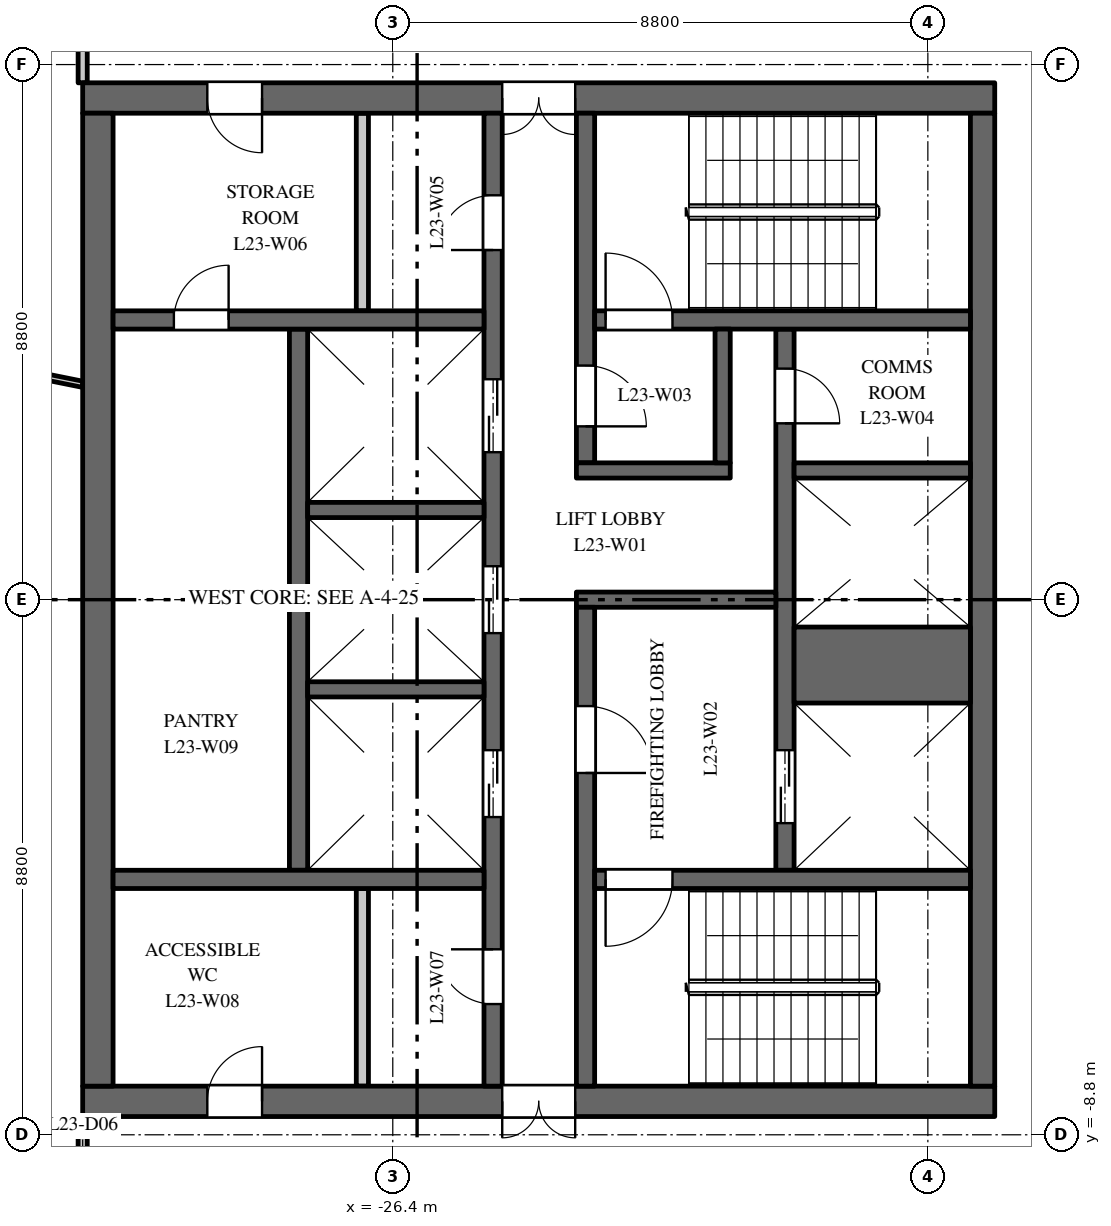
"""IFC4 building model, lengths in metres.
Left out: names, types, materials, properties, quantities, classifications, styles, units other than length and angle.
Written with IfcOpenShell. Run it as: python <this file> out.ifc"""

import sys

from ifc_helpers import new_model, si_unit, direction, frame, frame_2d, origin, place, context, subcontext, project, spatial, rectangle, extrude, element, fill, save


model = new_model("IFC4")
c1 = context("Model", 3, precision=1e-05, world=origin(), true_north=direction((0.0, 1.0)))
c2 = subcontext(c1, "Body", "Model", "MODEL_VIEW")
j1 = project(units=[si_unit("LENGTHUNIT", "METRE"), si_unit("PLANEANGLEUNIT", "RADIAN")], contexts=[c1])
p1 = place(None, origin())
s1 = spatial("IfcSite", under=j1, at=p1, CompositionType="ELEMENT")
p2 = place(p1, origin())
s2 = spatial("IfcBuilding", under=s1, at=p2, CompositionType="ELEMENT")
p3 = place(p2, frame((0.0, 0.0, 104.0)))
s3 = spatial("IfcBuildingStorey", under=s2, at=p3, CompositionType="ELEMENT", Elevation=104.0)
p4 = place(p3, frame((-16.5, 8.25, 0.0), z_axis=(0.0, 0.0, 1.0), x_axis=(-1.0, 0.0, 0.0)))
e1 = element("IfcWall", 1, at=p4, inside=s3, PredefinedType="SHEAR", context=c2, shape_type="SweptSolid", body=[
    extrude(rectangle(XDim=15.0, YDim=0.5, at=frame_2d((7.5, 0.0))), origin(), (0.0, 0.0, 1.0), 3.7),
])
p5 = place(p4, frame((6.9, 0.0, 0.0)))
e2 = element("IfcOpeningElement", 2, at=p5, cuts=e1, PredefinedType="OPENING", context=c2, shape_type="SweptSolid", body=[
    extrude(rectangle(XDim=1.2, YDim=2.1, at=frame_2d((0.6, 1.05))), frame((0.0, 0.26, 0.0), z_axis=(0.0, -1.0, 0.0), x_axis=(1.0, 0.0, 0.0)), (0.0, 0.0, 1.0), 0.52),
])
p6 = place(p4, frame((12.05, 0.0, 0.0)))
e3 = element("IfcOpeningElement", 3, at=p6, cuts=e1, PredefinedType="OPENING", context=c2, shape_type="SweptSolid", body=[
    extrude(rectangle(XDim=0.9, YDim=2.1, at=frame_2d((0.45, 1.05))), frame((0.0, 0.26, 0.0), z_axis=(0.0, -1.0, 0.0), x_axis=(1.0, 0.0, 0.0)), (0.0, 0.0, 1.0), 0.52),
])
p7 = place(p3, frame((-16.5, -8.25, 0.0), z_axis=(0.0, 0.0, 1.0), x_axis=(-1.0, 0.0, 0.0)))
e4 = element("IfcWall", 4, at=p7, inside=s3, PredefinedType="SHEAR", context=c2, shape_type="SweptSolid", body=[
    extrude(rectangle(XDim=15.0, YDim=0.5, at=frame_2d((7.5, 0.0))), origin(), (0.0, 0.0, 1.0), 3.7),
])
p8 = place(p7, frame((6.9, 0.0, 0.0)))
e5 = element("IfcOpeningElement", 5, at=p8, cuts=e4, PredefinedType="OPENING", context=c2, shape_type="SweptSolid", body=[
    extrude(rectangle(XDim=1.2, YDim=2.1, at=frame_2d((0.6, 1.05))), frame((0.0, 0.26, 0.0), z_axis=(0.0, -1.0, 0.0), x_axis=(1.0, 0.0, 0.0)), (0.0, 0.0, 1.0), 0.52),
])
p9 = place(p7, frame((12.05, 0.0, 0.0)))
e6 = element("IfcOpeningElement", 6, at=p9, cuts=e4, PredefinedType="OPENING", context=c2, shape_type="SweptSolid", body=[
    extrude(rectangle(XDim=0.9, YDim=2.1, at=frame_2d((0.45, 1.05))), frame((0.0, 0.26, 0.0), z_axis=(0.0, -1.0, 0.0), x_axis=(1.0, 0.0, 0.0)), (0.0, 0.0, 1.0), 0.52),
])
p10 = place(p3, frame((-27.95, -4.45, 0.0), z_axis=(0.0, 0.0, 1.0), x_axis=(0.0, 1.0, 0.0)))
e7 = element("IfcWall", 7, at=p10, inside=s3, PredefinedType="SHEAR", context=c2, shape_type="SweptSolid", body=[
    extrude(rectangle(XDim=8.9, YDim=0.3, at=frame_2d((4.45, 0.0))), origin(), (0.0, 0.0, 1.0), 3.7),
])
p11 = place(p3, frame((-19.95, -4.45, 0.0), z_axis=(0.0, 0.0, 1.0), x_axis=(0.0, 1.0, 0.0)))
e8 = element("IfcWall", 8, at=p11, inside=s3, PredefinedType="SHEAR", context=c2, shape_type="SweptSolid", body=[
    extrude(rectangle(XDim=8.9, YDim=0.3, at=frame_2d((4.45, 0.0))), origin(), (0.0, 0.0, 1.0), 3.7),
])
p12 = place(p11, frame((0.775, 0.0, 0.0)))
e9 = element("IfcOpeningElement", 9, at=p12, cuts=e8, PredefinedType="OPENING", context=c2, shape_type="SweptSolid", body=[
    extrude(rectangle(XDim=1.2, YDim=2.1, at=frame_2d((0.6, 1.05))), frame((0.0, 0.16, 0.0), z_axis=(0.0, -1.0, 0.0), x_axis=(1.0, 0.0, 0.0)), (0.0, 0.0, 1.0), 0.32),
])
p13 = place(p11, frame((7.35, 0.0, 0.0)))
e10 = element("IfcOpeningElement", 10, at=p13, cuts=e8, PredefinedType="OPENING", context=c2, shape_type="SweptSolid", body=[
    extrude(rectangle(XDim=0.9, YDim=2.1, at=frame_2d((0.45, 1.05))), frame((0.0, 0.16, 0.0), z_axis=(0.0, -1.0, 0.0), x_axis=(1.0, 0.0, 0.0)), (0.0, 0.0, 1.0), 0.32),
])
p14 = place(p3, frame((-24.75, -8.0, 0.0), z_axis=(0.0, 0.0, 1.0), x_axis=(0.0, 1.0, 0.0)))
e11 = element("IfcWall", 11, at=p14, inside=s3, PredefinedType="SHEAR", context=c2, shape_type="SweptSolid", body=[
    extrude(rectangle(XDim=16.0, YDim=0.3, at=frame_2d((8.0, 0.0))), origin(), (0.0, 0.0, 1.0), 3.7),
])
p15 = place(p14, frame((4.425, 0.0, 0.0)))
e12 = element("IfcOpeningElement", 12, at=p15, cuts=e11, PredefinedType="OPENING", context=c2, shape_type="SweptSolid", body=[
    extrude(rectangle(XDim=1.1, YDim=2.1, at=frame_2d((0.55, 1.05))), frame((0.0, 0.16, 0.0), z_axis=(0.0, -1.0, 0.0), x_axis=(1.0, 0.0, 0.0)), (0.0, 0.0, 1.0), 0.32),
])
p16 = place(p14, frame((7.45, 0.0, 0.0)))
e13 = element("IfcOpeningElement", 13, at=p16, cuts=e11, PredefinedType="OPENING", context=c2, shape_type="SweptSolid", body=[
    extrude(rectangle(XDim=1.1, YDim=2.1, at=frame_2d((0.55, 1.05))), frame((0.0, 0.16, 0.0), z_axis=(0.0, -1.0, 0.0), x_axis=(1.0, 0.0, 0.0)), (0.0, 0.0, 1.0), 0.32),
])
p17 = place(p14, frame((10.425, 0.0, 0.0)))
e14 = element("IfcOpeningElement", 14, at=p17, cuts=e11, PredefinedType="OPENING", context=c2, shape_type="SweptSolid", body=[
    extrude(rectangle(XDim=1.2, YDim=2.1, at=frame_2d((0.6, 1.05))), frame((0.0, 0.16, 0.0), z_axis=(0.0, -1.0, 0.0), x_axis=(1.0, 0.0, 0.0)), (0.0, 0.0, 1.0), 0.32),
])
p18 = place(p14, frame((13.75, 0.0, 0.0)))
e15 = element("IfcOpeningElement", 15, at=p18, cuts=e11, PredefinedType="OPENING", context=c2, shape_type="SweptSolid", body=[
    extrude(rectangle(XDim=0.9, YDim=2.1, at=frame_2d((0.45, 1.05))), frame((0.0, 0.16, 0.0), z_axis=(0.0, -1.0, 0.0), x_axis=(1.0, 0.0, 0.0)), (0.0, 0.0, 1.0), 0.32),
])
p19 = place(p14, frame((1.35, 0.0, 0.0)))
e16 = element("IfcOpeningElement", 16, at=p19, cuts=e11, PredefinedType="OPENING", context=c2, shape_type="SweptSolid", body=[
    extrude(rectangle(XDim=0.9, YDim=2.1, at=frame_2d((0.45, 1.05))), frame((0.0, 0.16, 0.0), z_axis=(0.0, -1.0, 0.0), x_axis=(1.0, 0.0, 0.0)), (0.0, 0.0, 1.0), 0.32),
])
p20 = place(p3, frame((-20.1, 0.0, 0.0), z_axis=(0.0, 0.0, 1.0), x_axis=(-1.0, 0.0, 0.0)))
e17 = element("IfcWall", 17, at=p20, inside=s3, PredefinedType="SHEAR", context=c2, shape_type="SweptSolid", body=[
    extrude(rectangle(XDim=3.28, YDim=0.25, at=frame_2d((1.64, 0.0))), origin(), (0.0, 0.0, 1.0), 3.7),
])
p21 = place(p3, frame((-16.7, -8.0, 0.0), z_axis=(0.0, 0.0, 1.0), x_axis=(0.0, 1.0, 0.0)))
e18 = element("IfcWall", 18, at=p21, inside=s3, PredefinedType="SHEAR", context=c2, shape_type="SweptSolid", body=[
    extrude(rectangle(XDim=16.0, YDim=0.4, at=frame_2d((8.0, 0.0))), origin(), (0.0, 0.0, 1.0), 3.7),
])
p22 = place(p3, frame((-31.25, -8.0, 0.0), z_axis=(0.0, 0.0, 1.0), x_axis=(0.0, 1.0, 0.0)))
e19 = element("IfcWall", 19, at=p22, inside=s3, PredefinedType="SHEAR", context=c2, shape_type="SweptSolid", body=[
    extrude(rectangle(XDim=16.0, YDim=0.5, at=frame_2d((8.0, 0.0))), origin(), (0.0, 0.0, 1.0), 3.7),
])
p23 = place(p3, frame((-24.9, 4.6, 0.0), z_axis=(0.0, 0.0, 1.0), x_axis=(-1.0, 0.0, 0.0)))
e20 = element("IfcWall", 20, at=p23, inside=s3, PredefinedType="SHEAR", context=c2, shape_type="SweptSolid", body=[
    extrude(rectangle(XDim=6.1, YDim=0.3, at=frame_2d((3.05, 0.0))), origin(), (0.0, 0.0, 1.0), 3.7),
])
p24 = place(p23, frame((4.2, 0.0, 0.0)))
e21 = element("IfcOpeningElement", 21, at=p24, cuts=e20, PredefinedType="OPENING", context=c2, shape_type="SweptSolid", body=[
    extrude(rectangle(XDim=0.9, YDim=2.1, at=frame_2d((0.45, 1.05))), frame((0.0, 0.16, 0.0), z_axis=(0.0, -1.0, 0.0), x_axis=(1.0, 0.0, 0.0)), (0.0, 0.0, 1.0), 0.32),
])
for number, where, z_axis, x_axis in (
    (22, (-26.9, 4.75, 0.0), (0.0, 0.0, 1.0), (0.0, 1.0, 0.0)),
    (23, (-26.9, -8.0, 0.0), (0.0, 0.0, 1.0), (0.0, 1.0, 0.0)),
):
    element("IfcWall", number, at=place(p3, frame(where, z_axis=z_axis, x_axis=x_axis)), inside=s3, PredefinedType="PARTITIONING", context=c2, shape_type="SweptSolid", body=[
        extrude(rectangle(XDim=3.25, YDim=0.2, at=frame_2d((1.625, 0.0))), origin(), (0.0, 0.0, 1.0), 3.7),
    ])
p25 = place(p3, frame((-24.9, -4.6, 0.0), z_axis=(0.0, 0.0, 1.0), x_axis=(-1.0, 0.0, 0.0)))
e24 = element("IfcWall", 24, at=p25, inside=s3, PredefinedType="SHEAR", context=c2, shape_type="SweptSolid", body=[
    extrude(rectangle(XDim=6.1, YDim=0.3, at=frame_2d((3.05, 0.0))), origin(), (0.0, 0.0, 1.0), 3.7),
])
p26 = place(p3, frame((-16.9, -1.075, 0.0), z_axis=(0.0, 0.0, 1.0), x_axis=(-1.0, 0.0, 0.0)))
e25 = element("IfcWall", 25, at=p26, inside=s3, PredefinedType="SHEAR", context=c2, shape_type="SweptSolid", body=[
    extrude(rectangle(XDim=2.9, YDim=1.25, at=frame_2d((1.45, 0.0))), origin(), (0.0, 0.0, 1.0), 3.7),
])
for number, where, z_axis, x_axis in (
    (26, (-16.9, 2.125, 0.0), (0.0, 0.0, 1.0), (-1.0, 0.0, 0.0)),
    (27, (-24.9, -1.475, 0.0), (0.0, 0.0, 1.0), (-1.0, 0.0, 0.0)),
    (28, (-24.9, 1.475, 0.0), (0.0, 0.0, 1.0), (-1.0, 0.0, 0.0)),
):
    element("IfcWall", number, at=place(p3, frame(where, z_axis=z_axis, x_axis=x_axis)), inside=s3, PredefinedType="SHEAR", context=c2, shape_type="SweptSolid", body=[
        extrude(rectangle(XDim=2.9, YDim=0.25, at=frame_2d((1.45, 0.0))), origin(), (0.0, 0.0, 1.0), 3.7),
    ])
p27 = place(p3, frame((-23.23, 2.25, 0.0), z_axis=(0.0, 0.0, 1.0), x_axis=(0.0, 1.0, 0.0)))
e29 = element("IfcWall", 29, at=p27, inside=s3, PredefinedType="SHEAR", context=c2, shape_type="SweptSolid", body=[
    extrude(rectangle(XDim=5.75, YDim=0.3, at=frame_2d((2.875, 0.0))), origin(), (0.0, 0.0, 1.0), 3.7),
])
p28 = place(p27, frame((0.6, 0.0, 0.0)))
e30 = element("IfcOpeningElement", 30, at=p28, cuts=e29, PredefinedType="OPENING", context=c2, shape_type="SweptSolid", body=[
    extrude(rectangle(XDim=1.0, YDim=2.1, at=frame_2d((0.5, 1.05))), frame((0.0, 0.16, 0.0), z_axis=(0.0, -1.0, 0.0), x_axis=(1.0, 0.0, 0.0)), (0.0, 0.0, 1.0), 0.32),
])
p29 = place(p3, frame((-23.23, -8.0, 0.0), z_axis=(0.0, 0.0, 1.0), x_axis=(0.0, 1.0, 0.0)))
e31 = element("IfcWall", 31, at=p29, inside=s3, PredefinedType="SHEAR", context=c2, shape_type="SweptSolid", body=[
    extrude(rectangle(XDim=7.875, YDim=0.3, at=frame_2d((3.938, 0.0))), origin(), (0.0, 0.0, 1.0), 3.7),
])
p30 = place(p29, frame((5.15, 0.0, 0.0)))
e32 = element("IfcOpeningElement", 32, at=p30, cuts=e31, PredefinedType="OPENING", context=c2, shape_type="SweptSolid", body=[
    extrude(rectangle(XDim=1.1, YDim=2.1, at=frame_2d((0.55, 1.05))), frame((0.0, 0.16, 0.0), z_axis=(0.0, -1.0, 0.0), x_axis=(1.0, 0.0, 0.0)), (0.0, 0.0, 1.0), 0.32),
])
p31 = place(p3, frame((-16.9, 4.6, 0.0), z_axis=(0.0, 0.0, 1.0), x_axis=(-1.0, 0.0, 0.0)))
e33 = element("IfcWall", 33, at=p31, inside=s3, PredefinedType="SHEAR", context=c2, shape_type="SweptSolid", body=[
    extrude(rectangle(XDim=6.18, YDim=0.3, at=frame_2d((3.09, 0.0))), origin(), (0.0, 0.0, 1.0), 3.7),
])
p32 = place(p31, frame((4.9, 0.0, 0.0)))
e34 = element("IfcOpeningElement", 34, at=p32, cuts=e33, PredefinedType="OPENING", context=c2, shape_type="SweptSolid", body=[
    extrude(rectangle(XDim=1.1, YDim=2.1, at=frame_2d((0.55, 1.05))), frame((0.0, 0.16, 0.0), z_axis=(0.0, -1.0, 0.0), x_axis=(1.0, 0.0, 0.0)), (0.0, 0.0, 1.0), 0.32),
])
p33 = place(p3, frame((-16.9, -4.6, 0.0), z_axis=(0.0, 0.0, 1.0), x_axis=(-1.0, 0.0, 0.0)))
e35 = element("IfcWall", 35, at=p33, inside=s3, PredefinedType="SHEAR", context=c2, shape_type="SweptSolid", body=[
    extrude(rectangle(XDim=6.18, YDim=0.3, at=frame_2d((3.09, 0.0))), origin(), (0.0, 0.0, 1.0), 3.7),
])
p34 = place(p33, frame((4.9, 0.0, 0.0)))
e36 = element("IfcOpeningElement", 36, at=p34, cuts=e35, PredefinedType="OPENING", context=c2, shape_type="SweptSolid", body=[
    extrude(rectangle(XDim=1.1, YDim=2.1, at=frame_2d((0.55, 1.05))), frame((0.0, 0.16, 0.0), z_axis=(0.0, -1.0, 0.0), x_axis=(1.0, 0.0, 0.0)), (0.0, 0.0, 1.0), 0.32),
])
p35 = place(p3, frame((-20.85, 2.125, 0.0), z_axis=(0.0, 0.0, 1.0), x_axis=(-1.0, 0.0, 0.0)))
e37 = element("IfcWall", 37, at=p35, inside=s3, PredefinedType="SHEAR", context=c2, shape_type="SweptSolid", body=[
    extrude(rectangle(XDim=2.53, YDim=0.25, at=frame_2d((1.265, 0.0))), origin(), (0.0, 0.0, 1.0), 3.7),
])
p36 = place(p3, frame((-20.975, 2.25, 0.0), z_axis=(0.0, 0.0, 1.0), x_axis=(0.0, 1.0, 0.0)))
e38 = element("IfcWall", 38, at=p36, inside=s3, PredefinedType="SHEAR", context=c2, shape_type="SweptSolid", body=[
    extrude(rectangle(XDim=2.2, YDim=0.25, at=frame_2d((1.1, 0.0))), origin(), (0.0, 0.0, 1.0), 3.7),
])
p37 = place(p3, frame((-35.512, 4.349, 0.0), z_axis=(0.0, 0.0, 1.0), x_axis=(0.980357474535, -0.197228857227, 0.0)))
e39 = element("IfcWall", 39, at=p37, inside=s3, PredefinedType="PARTITIONING", context=c2, shape_type="SweptSolid", body=[
    extrude(rectangle(XDim=4.092, YDim=0.1, at=frame_2d((2.046, 0.0))), origin(), (0.0, 0.0, 1.0), 3.2),
])
p38 = place(p3, frame((-31.5, -10.7, 0.0), z_axis=(0.0, 0.0, 1.0), x_axis=(0.0, 1.0, 0.0)))
e40 = element("IfcWall", 40, at=p38, inside=s3, PredefinedType="PARTITIONING", context=c2, shape_type="SweptSolid", body=[
    extrude(rectangle(XDim=2.2, YDim=0.15, at=frame_2d((1.1, 0.0))), origin(), (0.0, 0.0, 1.0), 3.7),
])
p39 = place(p38, frame((0.55, 0.0, 0.0)))
e41 = element("IfcOpeningElement", 41, at=p39, cuts=e40, PredefinedType="OPENING", context=c2, shape_type="SweptSolid", body=[
    extrude(rectangle(XDim=1.0, YDim=2.1, at=frame_2d((0.5, 1.05))), frame((0.0, 0.085, 0.0), z_axis=(0.0, -1.0, 0.0), x_axis=(1.0, 0.0, 0.0)), (0.0, 0.0, 1.0), 0.17),
])
p40 = place(p3, frame((-31.5, 8.5, 0.0), z_axis=(0.0, 0.0, 1.0), x_axis=(0.0, 1.0, 0.0)))
e42 = element("IfcWall", 42, at=p40, inside=s3, PredefinedType="PARTITIONING", context=c2, shape_type="SweptSolid", body=[
    extrude(rectangle(XDim=2.2, YDim=0.15, at=frame_2d((1.1, 0.0))), origin(), (0.0, 0.0, 1.0), 3.7),
])
p41 = place(p12, origin())
e43 = element("IfcDoor", 43, at=p41, inside=s3, OperationType="DOUBLE_DOOR_SLIDING", PredefinedType="DOOR", context=c2, shape_type="SweptSolid", body=[
    extrude(rectangle(XDim=1.2, YDim=2.1, at=frame_2d((0.6, 1.05))), frame((0.0, 0.025, 0.0), z_axis=(0.0, -1.0, 0.0), x_axis=(1.0, 0.0, 0.0)), (0.0, 0.0, 1.0), 0.05),
])
fill(e9, e43)
p42 = place(p15, origin())
e44 = element("IfcDoor", 44, at=p42, inside=s3, OperationType="DOUBLE_DOOR_SLIDING", PredefinedType="DOOR", context=c2, shape_type="SweptSolid", body=[
    extrude(rectangle(XDim=1.1, YDim=2.1, at=frame_2d((0.55, 1.05))), frame((0.0, 0.025, 0.0), z_axis=(0.0, -1.0, 0.0), x_axis=(1.0, 0.0, 0.0)), (0.0, 0.0, 1.0), 0.05),
])
fill(e12, e44)
p43 = place(p16, origin())
e45 = element("IfcDoor", 45, at=p43, inside=s3, OperationType="DOUBLE_DOOR_SLIDING", PredefinedType="DOOR", context=c2, shape_type="SweptSolid", body=[
    extrude(rectangle(XDim=1.1, YDim=2.1, at=frame_2d((0.55, 1.05))), frame((0.0, 0.025, 0.0), z_axis=(0.0, -1.0, 0.0), x_axis=(1.0, 0.0, 0.0)), (0.0, 0.0, 1.0), 0.05),
])
fill(e13, e45)
p44 = place(p17, origin())
e46 = element("IfcDoor", 46, at=p44, inside=s3, OperationType="DOUBLE_DOOR_SLIDING", PredefinedType="DOOR", context=c2, shape_type="SweptSolid", body=[
    extrude(rectangle(XDim=1.2, YDim=2.1, at=frame_2d((0.6, 1.05))), frame((0.0, 0.025, 0.0), z_axis=(0.0, -1.0, 0.0), x_axis=(1.0, 0.0, 0.0)), (0.0, 0.0, 1.0), 0.05),
])
fill(e14, e46)
p45 = place(p32, origin())
e47 = element("IfcDoor", 47, at=p45, inside=s3, OperationType="SINGLE_SWING_RIGHT", PredefinedType="DOOR", context=c2, shape_type="SweptSolid", body=[
    extrude(rectangle(XDim=1.1, YDim=2.1, at=frame_2d((0.55, 1.05))), frame((0.0, 0.025, 0.0), z_axis=(0.0, -1.0, 0.0), x_axis=(1.0, 0.0, 0.0)), (0.0, 0.0, 1.0), 0.05),
])
fill(e34, e47)
p46 = place(p34, origin())
e48 = element("IfcDoor", 48, at=p46, inside=s3, OperationType="SINGLE_SWING_LEFT", PredefinedType="DOOR", context=c2, shape_type="SweptSolid", body=[
    extrude(rectangle(XDim=1.1, YDim=2.1, at=frame_2d((0.55, 1.05))), frame((0.0, 0.025, 0.0), z_axis=(0.0, -1.0, 0.0), x_axis=(1.0, 0.0, 0.0)), (0.0, 0.0, 1.0), 0.05),
])
fill(e36, e48)
p47 = place(p30, origin())
e49 = element("IfcDoor", 49, at=p47, inside=s3, OperationType="SINGLE_SWING_LEFT", PredefinedType="DOOR", context=c2, shape_type="SweptSolid", body=[
    extrude(rectangle(XDim=1.1, YDim=2.1, at=frame_2d((0.55, 1.05))), frame((0.0, 0.025, 0.0), z_axis=(0.0, -1.0, 0.0), x_axis=(1.0, 0.0, 0.0)), (0.0, 0.0, 1.0), 0.05),
])
fill(e32, e49)
p48 = place(p28, origin())
e50 = element("IfcDoor", 50, at=p48, inside=s3, OperationType="SINGLE_SWING_LEFT", PredefinedType="DOOR", context=c2, shape_type="SweptSolid", body=[
    extrude(rectangle(XDim=1.0, YDim=2.1, at=frame_2d((0.5, 1.05))), frame((0.0, 0.025, 0.0), z_axis=(0.0, -1.0, 0.0), x_axis=(1.0, 0.0, 0.0)), (0.0, 0.0, 1.0), 0.05),
])
fill(e30, e50)
p49 = place(p5, origin())
e51 = element("IfcDoor", 51, at=p49, inside=s3, OperationType="DOUBLE_DOOR_DOUBLE_SWING", PredefinedType="DOOR", context=c2, shape_type="SweptSolid", body=[
    extrude(rectangle(XDim=1.2, YDim=2.1, at=frame_2d((0.6, 1.05))), frame((0.0, 0.025, 0.0), z_axis=(0.0, -1.0, 0.0), x_axis=(1.0, 0.0, 0.0)), (0.0, 0.0, 1.0), 0.05),
])
fill(e2, e51)
p50 = place(p8, origin())
e52 = element("IfcDoor", 52, at=p50, inside=s3, OperationType="DOUBLE_DOOR_DOUBLE_SWING", PredefinedType="DOOR", context=c2, shape_type="SweptSolid", body=[
    extrude(rectangle(XDim=1.2, YDim=2.1, at=frame_2d((0.6, 1.05))), frame((0.0, 0.025, 0.0), z_axis=(0.0, -1.0, 0.0), x_axis=(1.0, 0.0, 0.0)), (0.0, 0.0, 1.0), 0.05),
])
fill(e5, e52)
p51 = place(p13, origin())
e53 = element("IfcDoor", 53, at=p51, inside=s3, OperationType="SINGLE_SWING_LEFT", PredefinedType="DOOR", context=c2, shape_type="SweptSolid", body=[
    extrude(rectangle(XDim=0.9, YDim=2.1, at=frame_2d((0.45, 1.05))), frame((0.0, 0.025, 0.0), z_axis=(0.0, -1.0, 0.0), x_axis=(1.0, 0.0, 0.0)), (0.0, 0.0, 1.0), 0.05),
])
fill(e10, e53)
p52 = place(p18, origin())
e54 = element("IfcDoor", 54, at=p52, inside=s3, OperationType="SINGLE_SWING_RIGHT", PredefinedType="DOOR", context=c2, shape_type="SweptSolid", body=[
    extrude(rectangle(XDim=0.9, YDim=2.1, at=frame_2d((0.45, 1.05))), frame((0.0, 0.025, 0.0), z_axis=(0.0, -1.0, 0.0), x_axis=(1.0, 0.0, 0.0)), (0.0, 0.0, 1.0), 0.05),
])
fill(e15, e54)
p53 = place(p6, origin())
e55 = element("IfcDoor", 55, at=p53, inside=s3, OperationType="SINGLE_SWING_RIGHT", PredefinedType="DOOR", context=c2, shape_type="SweptSolid", body=[
    extrude(rectangle(XDim=0.9, YDim=2.1, at=frame_2d((0.45, 1.05))), frame((0.0, 0.025, 0.0), z_axis=(0.0, -1.0, 0.0), x_axis=(1.0, 0.0, 0.0)), (0.0, 0.0, 1.0), 0.05),
])
fill(e3, e55)
p54 = place(p19, origin())
e56 = element("IfcDoor", 56, at=p54, inside=s3, OperationType="SINGLE_SWING_LEFT", PredefinedType="DOOR", context=c2, shape_type="SweptSolid", body=[
    extrude(rectangle(XDim=0.9, YDim=2.1, at=frame_2d((0.45, 1.05))), frame((0.0, 0.025, 0.0), z_axis=(0.0, -1.0, 0.0), x_axis=(1.0, 0.0, 0.0)), (0.0, 0.0, 1.0), 0.05),
])
fill(e16, e56)
p55 = place(p9, origin())
e57 = element("IfcDoor", 57, at=p55, inside=s3, OperationType="SINGLE_SWING_LEFT", PredefinedType="DOOR", context=c2, shape_type="SweptSolid", body=[
    extrude(rectangle(XDim=0.9, YDim=2.1, at=frame_2d((0.45, 1.05))), frame((0.0, 0.025, 0.0), z_axis=(0.0, -1.0, 0.0), x_axis=(1.0, 0.0, 0.0)), (0.0, 0.0, 1.0), 0.05),
])
fill(e6, e57)
p56 = place(p24, origin())
e58 = element("IfcDoor", 58, at=p56, inside=s3, OperationType="SINGLE_SWING_LEFT", PredefinedType="DOOR", context=c2, shape_type="SweptSolid", body=[
    extrude(rectangle(XDim=0.9, YDim=2.1, at=frame_2d((0.45, 1.05))), frame((0.0, 0.025, 0.0), z_axis=(0.0, -1.0, 0.0), x_axis=(1.0, 0.0, 0.0)), (0.0, 0.0, 1.0), 0.05),
])
fill(e21, e58)
save(model, sys.argv[1])
